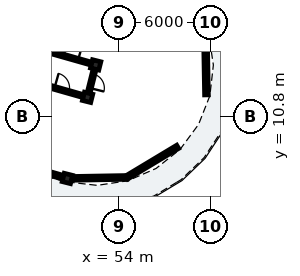
"""IFC4 building model, lengths in metres.
Left out: names, types, materials, properties, quantities, classifications, styles, units other than length and angle.
Written with IfcOpenShell. Run it as: python <this file> out.ifc"""

import sys

from ifc_helpers import new_model, si_unit, direction, frame, frame_2d, origin, origin_2d, place, context, subcontext, project, spatial, rectangle, extrude, element, fill, save


model = new_model("IFC4")
c1 = context("Model", 3, precision=1e-05, world=origin(), true_north=direction((0.0, 1.0)))
c2 = subcontext(c1, "Body", "Model", "MODEL_VIEW")
j1 = project(units=[si_unit("LENGTHUNIT", "METRE"), si_unit("PLANEANGLEUNIT", "RADIAN")], contexts=[c1])
p1 = place(None, origin())
s1 = spatial("IfcSite", under=j1, at=p1, CompositionType="ELEMENT")
p2 = place(p1, origin())
s2 = spatial("IfcBuilding", under=s1, at=p2, CompositionType="ELEMENT")
p3 = place(p2, frame((0.0, 0.0, 12.2)))
s3 = spatial("IfcBuildingStorey", under=s2, at=p3, CompositionType="ELEMENT", Elevation=12.2)
for number, where, z_axis, x_axis in (
    (1, (52.456, 14.19, 0.0), (0.0, 0.0, 1.0), (-0.242, -0.97, 0.0)),
    (2, (51.924, 12.055, 0.0), (0.0, 0.0, 1.0), (-0.242, -0.97, 0.0)),
    (3, (50.594, 6.719, 0.0), (0.0, 0.0, 1.0), (-0.242, -0.97, 0.0)),
):
    element("IfcColumn", number, at=place(p3, frame(where, z_axis=z_axis, x_axis=x_axis)), inside=s3, PredefinedType="COLUMN", context=c2, shape_type="SweptSolid", body=[
        extrude(rectangle(XDim=0.56, YDim=0.56, at=origin_2d()), origin(), (0.0, 0.0, 1.0), 3.105),
    ])
p4 = place(p3, frame((46.999, 7.741, 0.0), z_axis=(0.0, 0.0, 1.0), x_axis=(0.961871954212, -0.2735001713, 0.0)))
e4 = element("IfcWall", 4, at=p4, inside=s3, PredefinedType="SOLIDWALL", context=c2, shape_type="SweptSolid", body=[
    extrude(rectangle(XDim=3.487, YDim=0.245, at=frame_2d((1.743, 0.0))), origin(), (0.0, 0.0, 1.0), 2.355),
])
p5 = place(p4, frame((1.123, 0.0, 0.55)))
e5 = element("IfcOpeningElement", 5, at=p5, cuts=e4, PredefinedType="OPENING", context=c2, shape_type="SweptSolid", body=[
    extrude(rectangle(XDim=1.24, YDim=1.535, at=frame_2d((0.62, 0.768))), frame((0.0, 0.133, 0.0), z_axis=(0.0, -1.0, 0.0), x_axis=(1.0, 0.0, 0.0)), (0.0, 0.0, 1.0), 0.265),
])
p6 = place(p3, frame((59.677, 16.126, 0.0), z_axis=(0.0, 0.0, 1.0), x_axis=(0.017490763899, -0.999847024888, 0.0)))
e6 = element("IfcWall", 6, at=p6, inside=s3, PredefinedType="SOLIDWALL", context=c2, shape_type="SweptSolid", body=[
    extrude(rectangle(XDim=3.908, YDim=0.245, at=frame_2d((1.954, 0.0))), origin(), (0.0, 0.0, 1.0), 2.355),
])
p7 = place(p6, frame((0.979, 0.0, 0.4)))
e7 = element("IfcOpeningElement", 7, at=p7, cuts=e6, PredefinedType="OPENING", context=c2, shape_type="SweptSolid", body=[
    extrude(rectangle(XDim=1.95, YDim=1.78, at=frame_2d((0.975, 0.89))), frame((0.0, 0.133, 0.0), z_axis=(0.0, -1.0, 0.0), x_axis=(1.0, 0.0, 0.0)), (0.0, 0.0, 1.0), 0.265),
])
p8 = place(p3, frame((57.851, 8.8, 0.0), z_axis=(0.0, 0.0, 1.0), x_axis=(-0.85715098885, -0.515065221417, 0.0)))
e8 = element("IfcWall", 8, at=p8, inside=s3, PredefinedType="SOLIDWALL", context=c2, shape_type="SweptSolid", body=[
    extrude(rectangle(XDim=3.908, YDim=0.245, at=frame_2d((1.954, 0.0))), origin(), (0.0, 0.0, 1.0), 2.355),
])
p9 = place(p8, frame((1.029, 0.0, 0.4)))
e9 = element("IfcOpeningElement", 9, at=p9, cuts=e8, PredefinedType="OPENING", context=c2, shape_type="SweptSolid", body=[
    extrude(rectangle(XDim=1.85, YDim=1.72, at=frame_2d((0.925, 0.86))), frame((0.0, 0.133, 0.0), z_axis=(0.0, -1.0, 0.0), x_axis=(1.0, 0.0, 0.0)), (0.0, 0.0, 1.0), 0.265),
])
p10 = place(p3, frame((54.501, 6.787, 0.0), z_axis=(0.0, 0.0, 1.0), x_axis=(-0.999848115368, -0.017428315893, 0.0)))
e10 = element("IfcWall", 10, at=p10, inside=s3, PredefinedType="SOLIDWALL", context=c2, shape_type="SweptSolid", body=[
    extrude(rectangle(XDim=3.908, YDim=0.245, at=frame_2d((1.954, 0.0))), origin(), (0.0, 0.0, 1.0), 2.355),
])
p11 = place(p10, frame((0.979, 0.0, 0.4)))
e11 = element("IfcOpeningElement", 11, at=p11, cuts=e10, PredefinedType="OPENING", context=c2, shape_type="SweptSolid", body=[
    extrude(rectangle(XDim=1.95, YDim=1.78, at=frame_2d((0.975, 0.89))), frame((0.0, 0.133, 0.0), z_axis=(0.0, -1.0, 0.0), x_axis=(1.0, 0.0, 0.0)), (0.0, 0.0, 1.0), 0.265),
])
p12 = place(p3, frame((48.859, 12.927, 0.0), z_axis=(0.0, 0.0, 1.0), x_axis=(0.961873892319, -0.273493355085, 0.0)))
e12 = element("IfcWall", 12, at=p12, inside=s3, PredefinedType="PARTITIONING", context=c2, shape_type="SweptSolid", body=[
    extrude(rectangle(XDim=2.837, YDim=0.195, at=frame_2d((1.418, 0.0))), origin(), (0.0, 0.0, 1.0), 2.37),
])
p13 = place(p12, frame((0.924, 0.0, 0.0)))
e13 = element("IfcOpeningElement", 13, at=p13, cuts=e12, PredefinedType="OPENING", context=c2, shape_type="SweptSolid", body=[
    extrude(rectangle(XDim=0.99, YDim=2.16, at=frame_2d((0.495, 1.08))), frame((0.0, 0.107, 0.0), z_axis=(0.0, -1.0, 0.0), x_axis=(1.0, 0.0, 0.0)), (0.0, 0.0, 1.0), 0.215),
])
p14 = place(p3, frame((49.53, 15.022, 0.0), z_axis=(0.0, 0.0, 1.0), x_axis=(0.961861926514, -0.273535435224, 0.0)))
e14 = element("IfcWall", 14, at=p14, inside=s3, PredefinedType="PARTITIONING", context=c2, shape_type="SweptSolid", body=[
    extrude(rectangle(XDim=2.693, YDim=0.195, at=frame_2d((1.346, 0.0))), origin(), (0.0, 0.0, 1.0), 2.37),
])
p15 = place(p14, frame((0.852, 0.0, 0.0)))
e15 = element("IfcOpeningElement", 15, at=p15, cuts=e14, PredefinedType="OPENING", context=c2, shape_type="SweptSolid", body=[
    extrude(rectangle(XDim=0.99, YDim=2.16, at=frame_2d((0.495, 1.08))), frame((0.0, 0.107, 0.0), z_axis=(0.0, -1.0, 0.0), x_axis=(1.0, 0.0, 0.0)), (0.0, 0.0, 1.0), 0.215),
])
p16 = place(p3, frame((52.444, 14.142, 0.0), z_axis=(0.0, 0.0, 1.0), x_axis=(-0.241933770084, -0.970292765557, 0.0)))
e16 = element("IfcWall", 16, at=p16, inside=s3, PredefinedType="PARTITIONING", context=c2, shape_type="SweptSolid", body=[
    extrude(rectangle(XDim=2.1, YDim=0.195, at=frame_2d((1.05, 0.0))), origin(), (0.0, 0.0, 1.0), 2.37),
])
p17 = place(p16, frame((0.57, 0.0, 0.0)))
e17 = element("IfcOpeningElement", 17, at=p17, cuts=e16, PredefinedType="OPENING", context=c2, shape_type="SweptSolid", body=[
    extrude(rectangle(XDim=0.95, YDim=2.13, at=frame_2d((0.475, 1.065))), frame((0.0, 0.107, 0.0), z_axis=(0.0, -1.0, 0.0), x_axis=(1.0, 0.0, 0.0)), (0.0, 0.0, 1.0), 0.215),
])
p18 = place(p7, origin())
e18 = element("IfcWindow", 18, at=p18, inside=s3, PartitioningType="SINGLE_PANEL", PredefinedType="WINDOW", context=c2, shape_type="SweptSolid", body=[
    extrude(rectangle(XDim=1.95, YDim=1.78, at=frame_2d((0.975, 0.89))), frame((0.0, 0.03, 0.0), z_axis=(0.0, -1.0, 0.0), x_axis=(1.0, 0.0, 0.0)), (0.0, 0.0, 1.0), 0.06),
])
fill(e7, e18)
p19 = place(p9, origin())
e19 = element("IfcWindow", 19, at=p19, inside=s3, PartitioningType="SINGLE_PANEL", PredefinedType="WINDOW", context=c2, shape_type="SweptSolid", body=[
    extrude(rectangle(XDim=1.85, YDim=1.72, at=frame_2d((0.925, 0.86))), frame((0.0, 0.03, 0.0), z_axis=(0.0, -1.0, 0.0), x_axis=(1.0, 0.0, 0.0)), (0.0, 0.0, 1.0), 0.06),
])
fill(e9, e19)
p20 = place(p11, origin())
e20 = element("IfcWindow", 20, at=p20, inside=s3, PartitioningType="SINGLE_PANEL", PredefinedType="WINDOW", context=c2, shape_type="SweptSolid", body=[
    extrude(rectangle(XDim=1.95, YDim=1.78, at=frame_2d((0.975, 0.89))), frame((0.0, 0.03, 0.0), z_axis=(0.0, -1.0, 0.0), x_axis=(1.0, 0.0, 0.0)), (0.0, 0.0, 1.0), 0.06),
])
fill(e11, e20)
p21 = place(p13, origin())
e21 = element("IfcDoor", 21, at=p21, inside=s3, OperationType="SINGLE_SWING_LEFT", PredefinedType="DOOR", context=c2, shape_type="SweptSolid", body=[
    extrude(rectangle(XDim=0.99, YDim=2.16, at=frame_2d((0.495, 1.08))), frame((0.0, 0.025, 0.0), z_axis=(0.0, -1.0, 0.0), x_axis=(1.0, 0.0, 0.0)), (0.0, 0.0, 1.0), 0.05),
])
fill(e13, e21)
p22 = place(p15, origin())
e22 = element("IfcDoor", 22, at=p22, inside=s3, OperationType="SINGLE_SWING_RIGHT", PredefinedType="DOOR", context=c2, shape_type="SweptSolid", body=[
    extrude(rectangle(XDim=0.99, YDim=2.16, at=frame_2d((0.495, 1.08))), frame((0.0, 0.025, 0.0), z_axis=(0.0, -1.0, 0.0), x_axis=(1.0, 0.0, 0.0)), (0.0, 0.0, 1.0), 0.05),
])
fill(e15, e22)
p23 = place(p17, origin())
e23 = element("IfcDoor", 23, at=p23, inside=s3, OperationType="SINGLE_SWING_RIGHT", PredefinedType="DOOR", context=c2, shape_type="SweptSolid", body=[
    extrude(rectangle(XDim=0.95, YDim=2.13, at=frame_2d((0.475, 1.065))), frame((0.0, 0.025, 0.0), z_axis=(0.0, -1.0, 0.0), x_axis=(1.0, 0.0, 0.0)), (0.0, 0.0, 1.0), 0.05),
])
fill(e17, e23)
save(model, sys.argv[1])
